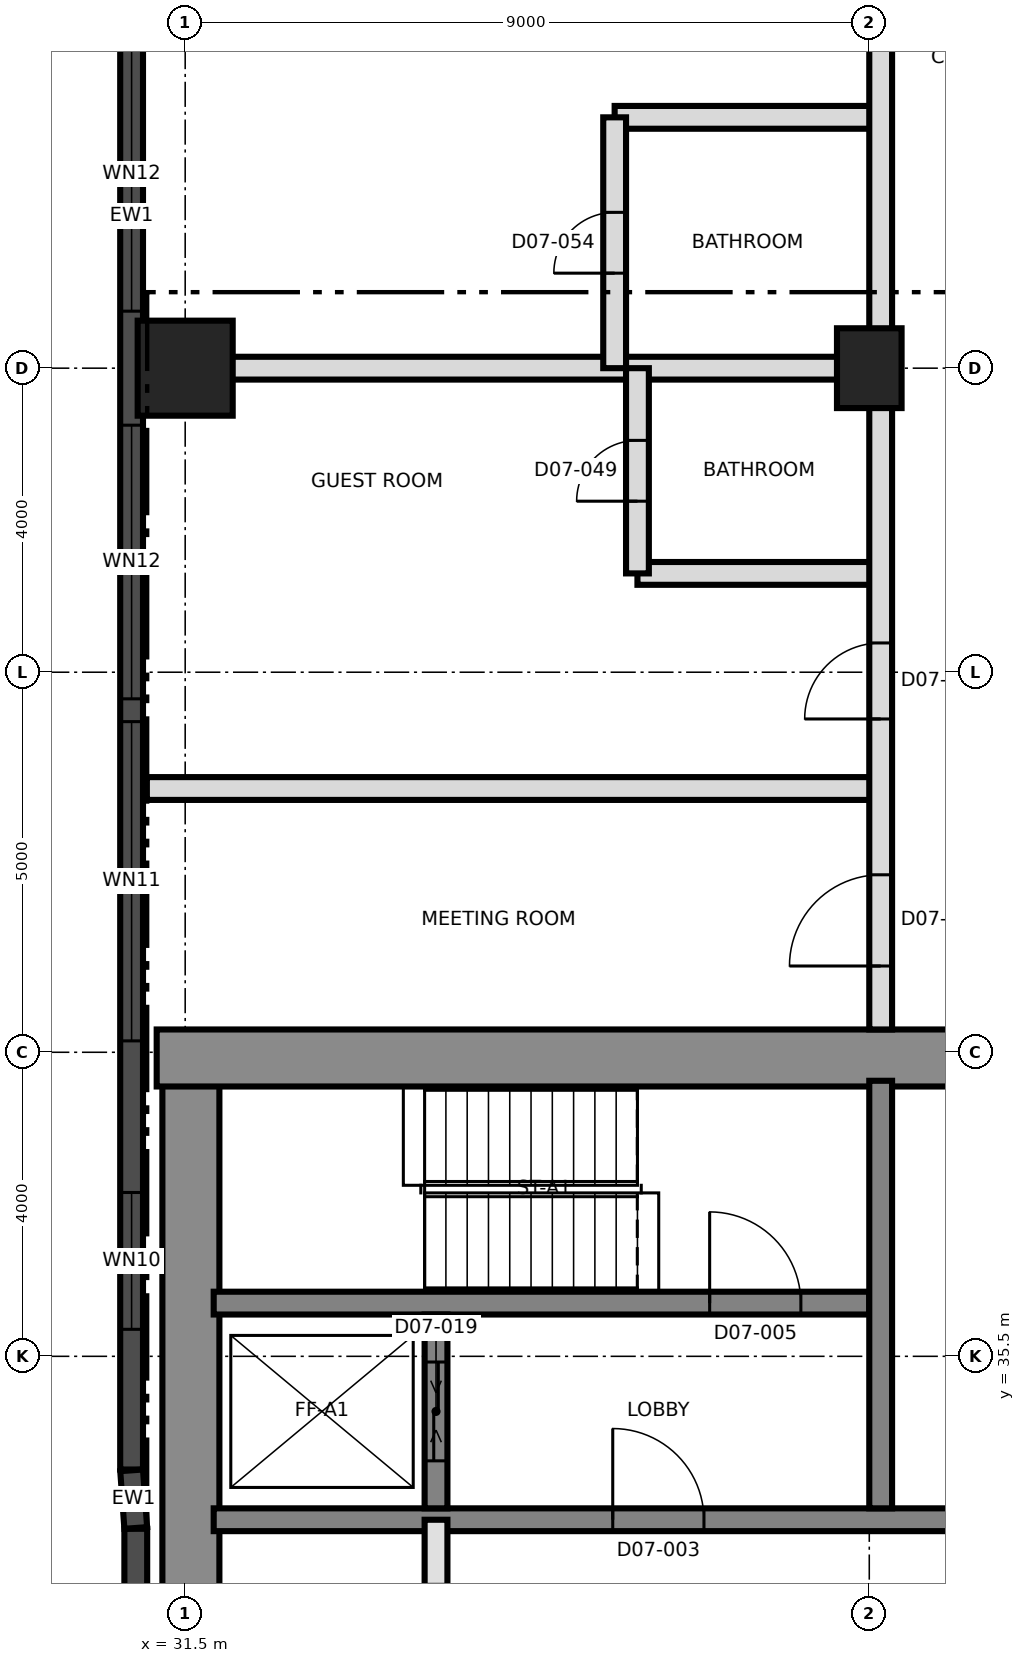
"""IFC4 building model, lengths in metres.
Left out: names, types, materials, properties, quantities, classifications, styles, units other than length and angle.
Written with IfcOpenShell. Run it as: python <this file> out.ifc"""

import sys

from ifc_helpers import new_model, si_unit, direction, frame, frame_2d, origin, origin_2d, place, context, subcontext, project, spatial, rectangle, extrude, element, fill, save


model = new_model("IFC4")
c1 = context("Model", 3, precision=1e-05, world=origin(), true_north=direction((0.0, 1.0)))
c2 = subcontext(c1, "Body", "Model", "MODEL_VIEW")
j1 = project(units=[si_unit("LENGTHUNIT", "METRE"), si_unit("PLANEANGLEUNIT", "RADIAN")], contexts=[c1])
p1 = place(None, origin())
s1 = spatial("IfcSite", under=j1, at=p1, CompositionType="ELEMENT")
p2 = place(p1, origin())
s2 = spatial("IfcBuilding", under=s1, at=p2, CompositionType="ELEMENT")
p3 = place(p2, frame((0.0, 0.0, 94.5)))
s3 = spatial("IfcBuildingStorey", under=s2, at=p3, CompositionType="ELEMENT", Elevation=94.5)
p4 = place(p3, frame((31.575, 21.875, 0.0), z_axis=(0.0, 0.0, 1.0), x_axis=(0.0, 1.0, 0.0)))
e1 = element("IfcWall", 1, at=p4, inside=s3, PredefinedType="SHEAR", context=c2, shape_type="SweptSolid", body=[
    extrude(rectangle(XDim=17.25, YDim=0.75, at=frame_2d((8.625, 0.0))), origin(), (0.0, 0.0, 1.0), 3.7),
])
p5 = place(p3, frame((31.125, 39.425, 0.0), z_axis=(0.0, 0.0, 1.0), x_axis=(1.0, 0.0, 0.0)))
e2 = element("IfcWall", 2, at=p5, inside=s3, PredefinedType="SHEAR", context=c2, shape_type="SweptSolid", body=[
    extrude(rectangle(XDim=27.0, YDim=0.75, at=frame_2d((13.5, 0.0))), origin(), (0.0, 0.0, 1.0), 3.7),
])
p6 = place(p5, frame((10.575, 0.0, 0.0)))
e3 = element("IfcOpeningElement", 3, at=p6, cuts=e2, PredefinedType="OPENING", context=c2, shape_type="SweptSolid", body=[
    extrude(rectangle(XDim=1.2, YDim=2.1, at=frame_2d((0.6, 1.05))), frame((0.0, 0.385, 0.0), z_axis=(0.0, -1.0, 0.0), x_axis=(1.0, 0.0, 0.0)), (0.0, 0.0, 1.0), 0.77),
])
p7 = place(p3, frame((31.875, 33.35, 0.0), z_axis=(0.0, 0.0, 1.0), x_axis=(1.0, 0.0, 0.0)))
e4 = element("IfcWall", 4, at=p7, inside=s3, PredefinedType="SHEAR", context=c2, shape_type="SweptSolid", body=[
    extrude(rectangle(XDim=26.25, YDim=0.3, at=frame_2d((13.125, 0.0))), origin(), (0.0, 0.0, 1.0), 3.7),
])
p8 = place(p7, frame((13.775, 0.0, 0.0)))
e5 = element("IfcOpeningElement", 5, at=p8, cuts=e4, PredefinedType="OPENING", context=c2, shape_type="SweptSolid", body=[
    extrude(rectangle(XDim=1.4, YDim=2.1, at=frame_2d((0.7, 1.05))), frame((0.0, 0.16, 0.0), z_axis=(0.0, -1.0, 0.0), x_axis=(1.0, 0.0, 0.0)), (0.0, 0.0, 1.0), 0.32),
])
p9 = place(p7, frame((5.25, 0.0, 0.0)))
e6 = element("IfcOpeningElement", 6, at=p9, cuts=e4, PredefinedType="OPENING", context=c2, shape_type="SweptSolid", body=[
    extrude(rectangle(XDim=1.2, YDim=2.1, at=frame_2d((0.6, 1.05))), frame((0.0, 0.16, 0.0), z_axis=(0.0, -1.0, 0.0), x_axis=(1.0, 0.0, 0.0)), (0.0, 0.0, 1.0), 0.32),
])
p10 = place(p7, frame((19.8, 0.0, 0.0)))
e7 = element("IfcOpeningElement", 7, at=p10, cuts=e4, PredefinedType="OPENING", context=c2, shape_type="SweptSolid", body=[
    extrude(rectangle(XDim=1.2, YDim=2.1, at=frame_2d((0.6, 1.05))), frame((0.0, 0.16, 0.0), z_axis=(0.0, -1.0, 0.0), x_axis=(1.0, 0.0, 0.0)), (0.0, 0.0, 1.0), 0.32),
])
p11 = place(p3, frame((31.875, 36.2, 0.0), z_axis=(0.0, 0.0, 1.0), x_axis=(1.0, 0.0, 0.0)))
e8 = element("IfcWall", 8, at=p11, inside=s3, PredefinedType="SHEAR", context=c2, shape_type="SweptSolid", body=[
    extrude(rectangle(XDim=8.625, YDim=0.3, at=frame_2d((4.312, 0.0))), origin(), (0.0, 0.0, 1.0), 3.7),
])
p12 = place(p11, frame((6.525, 0.0, 0.0)))
e9 = element("IfcOpeningElement", 9, at=p12, cuts=e8, PredefinedType="OPENING", context=c2, shape_type="SweptSolid", body=[
    extrude(rectangle(XDim=1.2, YDim=2.1, at=frame_2d((0.6, 1.05))), frame((0.0, 0.16, 0.0), z_axis=(0.0, -1.0, 0.0), x_axis=(1.0, 0.0, 0.0)), (0.0, 0.0, 1.0), 0.32),
])
p13 = place(p3, frame((40.65, 33.5, 0.0), z_axis=(0.0, 0.0, 1.0), x_axis=(0.0, 1.0, 0.0)))
e10 = element("IfcWall", 10, at=p13, inside=s3, PredefinedType="SHEAR", context=c2, shape_type="SweptSolid", body=[
    extrude(rectangle(XDim=5.625, YDim=0.3, at=frame_2d((2.812, 0.0))), origin(), (0.0, 0.0, 1.0), 3.7),
])
p14 = place(p3, frame((34.8, 33.5, 0.0), z_axis=(0.0, 0.0, 1.0), x_axis=(0.0, 1.0, 0.0)))
e11 = element("IfcWall", 11, at=p14, inside=s3, PredefinedType="SHEAR", context=c2, shape_type="SweptSolid", body=[
    extrude(rectangle(XDim=2.55, YDim=0.3, at=frame_2d((1.275, 0.0))), origin(), (0.0, 0.0, 1.0), 3.7),
])
p15 = place(p14, frame((0.625, 0.0, 0.0)))
e12 = element("IfcOpeningElement", 12, at=p15, cuts=e11, PredefinedType="OPENING", context=c2, shape_type="SweptSolid", body=[
    extrude(rectangle(XDim=1.3, YDim=2.4, at=frame_2d((0.65, 1.2))), frame((0.0, 0.16, 0.0), z_axis=(0.0, -1.0, 0.0), x_axis=(1.0, 0.0, 0.0)), (0.0, 0.0, 1.0), 0.32),
])
p16 = place(p3, frame((31.5, 48.5, 0.0), z_axis=(0.0, 0.0, 1.0), x_axis=(1.0, 0.0, 0.0)))
e13 = element("IfcColumn", 13, at=p16, inside=s3, PredefinedType="COLUMN", context=c2, shape_type="SweptSolid", body=[
    extrude(rectangle(XDim=1.25, YDim=1.25, at=origin_2d()), origin(), (0.0, 0.0, 1.0), 3.7),
])
p17 = place(p3, frame((40.5, 48.5, 0.0), z_axis=(0.0, 0.0, 1.0), x_axis=(0.0, 1.0, 0.0)))
e14 = element("IfcColumn", 14, at=p17, inside=s3, PredefinedType="COLUMN", context=c2, shape_type="SweptSolid", body=[
    extrude(rectangle(XDim=1.05, YDim=0.85, at=origin_2d()), origin(), (0.0, 0.0, 1.0), 3.7),
])
p18 = place(p3, frame((30.85, 33.231, 0.0), z_axis=(0.0, 0.0, 1.0), x_axis=(0.0, -1.0, 0.0)))
e15 = element("IfcWall", 15, at=p18, inside=s3, PredefinedType="SOLIDWALL", context=c2, shape_type="SweptSolid", body=[
    extrude(rectangle(XDim=11.871, YDim=0.3, at=frame_2d((5.936, 0.0))), origin(), (0.0, 0.0, 1.0), 3.4),
])
p19 = place(p3, frame((30.795, 66.992, 0.0), z_axis=(0.0, 0.0, 1.0), x_axis=(0.0, -1.0, 0.0)))
e16 = element("IfcWall", 16, at=p19, inside=s3, PredefinedType="SOLIDWALL", context=c2, shape_type="SweptSolid", body=[
    extrude(rectangle(XDim=32.981, YDim=0.3, at=frame_2d((16.491, 0.0))), origin(), (0.0, 0.0, 1.0), 3.4),
])
p20 = place(p19, frame((1.596, 0.0, 0.3)))
e17 = element("IfcOpeningElement", 17, at=p20, cuts=e16, PredefinedType="OPENING", context=c2, shape_type="SweptSolid", body=[
    extrude(rectangle(XDim=1.8, YDim=2.4, at=frame_2d((0.9, 1.2))), frame((0.0, 0.16, 0.0), z_axis=(0.0, -1.0, 0.0), x_axis=(1.0, 0.0, 0.0)), (0.0, 0.0, 1.0), 0.32),
])
p21 = place(p19, frame((5.142, 0.0, 0.9)))
e18 = element("IfcOpeningElement", 18, at=p21, cuts=e16, PredefinedType="OPENING", context=c2, shape_type="SweptSolid", body=[
    extrude(rectangle(XDim=3.6, YDim=1.5, at=frame_2d((1.8, 0.75))), frame((0.0, 0.16, 0.0), z_axis=(0.0, -1.0, 0.0), x_axis=(1.0, 0.0, 0.0)), (0.0, 0.0, 1.0), 0.32),
])
p22 = place(p19, frame((10.242, 0.0, 0.9)))
e19 = element("IfcOpeningElement", 19, at=p22, cuts=e16, PredefinedType="OPENING", context=c2, shape_type="SweptSolid", body=[
    extrude(rectangle(XDim=3.6, YDim=1.5, at=frame_2d((1.8, 0.75))), frame((0.0, 0.16, 0.0), z_axis=(0.0, -1.0, 0.0), x_axis=(1.0, 0.0, 0.0)), (0.0, 0.0, 1.0), 0.32),
])
p23 = place(p19, frame((14.142, 0.0, 0.9)))
e20 = element("IfcOpeningElement", 20, at=p23, cuts=e16, PredefinedType="OPENING", context=c2, shape_type="SweptSolid", body=[
    extrude(rectangle(XDim=3.6, YDim=1.5, at=frame_2d((1.8, 0.75))), frame((0.0, 0.16, 0.0), z_axis=(0.0, -1.0, 0.0), x_axis=(1.0, 0.0, 0.0)), (0.0, 0.0, 1.0), 0.32),
])
p24 = place(p19, frame((19.242, 0.0, 0.9)))
e21 = element("IfcOpeningElement", 21, at=p24, cuts=e16, PredefinedType="OPENING", context=c2, shape_type="SweptSolid", body=[
    extrude(rectangle(XDim=3.6, YDim=1.5, at=frame_2d((1.8, 0.75))), frame((0.0, 0.16, 0.0), z_axis=(0.0, -1.0, 0.0), x_axis=(1.0, 0.0, 0.0)), (0.0, 0.0, 1.0), 0.32),
])
p25 = place(p19, frame((23.142, 0.0, 0.9)))
e22 = element("IfcOpeningElement", 22, at=p25, cuts=e16, PredefinedType="OPENING", context=c2, shape_type="SweptSolid", body=[
    extrude(rectangle(XDim=4.2, YDim=1.5, at=frame_2d((2.1, 0.75))), frame((0.0, 0.16, 0.0), z_axis=(0.0, -1.0, 0.0), x_axis=(1.0, 0.0, 0.0)), (0.0, 0.0, 1.0), 0.32),
])
p26 = place(p19, frame((29.337, 0.0, 0.3)))
e23 = element("IfcOpeningElement", 23, at=p26, cuts=e16, PredefinedType="OPENING", context=c2, shape_type="SweptSolid", body=[
    extrude(rectangle(XDim=1.8, YDim=2.4, at=frame_2d((0.9, 1.2))), frame((0.0, 0.16, 0.0), z_axis=(0.0, -1.0, 0.0), x_axis=(1.0, 0.0, 0.0)), (0.0, 0.0, 1.0), 0.32),
])
p27 = place(p3, frame((30.795, 34.0, 0.0), z_axis=(0.0, 0.0, 1.0), x_axis=(0.07129269393, -0.997455438499, 0.0)))
e24 = element("IfcWall", 24, at=p27, inside=s3, PredefinedType="SOLIDWALL", context=c2, shape_type="SweptSolid", body=[
    extrude(rectangle(XDim=0.76, YDim=0.3, at=frame_2d((0.38, 0.0))), origin(), (0.0, 0.0, 1.0), 3.4),
])
p28 = place(p3, frame((34.8, 27.9, 0.0), z_axis=(0.0, 0.0, 1.0), x_axis=(0.0, 1.0, 0.0)))
e25 = element("IfcWall", 25, at=p28, inside=s3, PredefinedType="SOLIDWALL", context=c2, shape_type="SweptSolid", body=[
    extrude(rectangle(XDim=5.45, YDim=0.3, at=frame_2d((2.725, 0.0))), origin(), (0.0, 0.0, 1.0), 3.4),
])
p29 = place(p28, frame((3.6, 0.0, 0.0)))
e26 = element("IfcOpeningElement", 26, at=p29, cuts=e25, PredefinedType="OPENING", context=c2, shape_type="SweptSolid", body=[
    extrude(rectangle(XDim=1.0, YDim=2.1, at=frame_2d((0.5, 1.05))), frame((0.0, 0.16, 0.0), z_axis=(0.0, -1.0, 0.0), x_axis=(1.0, 0.0, 0.0)), (0.0, 0.0, 1.0), 0.32),
])
p30 = place(p3, frame((30.995, 42.97, 0.0), z_axis=(0.0, 0.0, 1.0), x_axis=(1.0, 0.0, 0.0)))
e27 = element("IfcWall", 27, at=p30, inside=s3, PredefinedType="PARTITIONING", context=c2, shape_type="SweptSolid", body=[
    extrude(rectangle(XDim=9.655, YDim=0.3, at=frame_2d((4.827, 0.0))), origin(), (0.0, 0.0, 1.0), 3.35),
])
p31 = place(p3, frame((37.45, 45.8, 0.0), z_axis=(0.0, 0.0, 1.0), x_axis=(1.0, 0.0, 0.0)))
e28 = element("IfcWall", 28, at=p31, inside=s3, PredefinedType="PARTITIONING", context=c2, shape_type="SweptSolid", body=[
    extrude(rectangle(XDim=3.2, YDim=0.3, at=frame_2d((1.6, 0.0))), origin(), (0.0, 0.0, 1.0), 3.4),
])
p32 = place(p3, frame((30.995, 48.5, 0.0), z_axis=(0.0, 0.0, 1.0), x_axis=(1.0, 0.0, 0.0)))
e29 = element("IfcWall", 29, at=p32, inside=s3, PredefinedType="PARTITIONING", context=c2, shape_type="SweptSolid", body=[
    extrude(rectangle(XDim=9.655, YDim=0.3, at=frame_2d((4.827, 0.0))), origin(), (0.0, 0.0, 1.0), 3.35),
])
p33 = place(p3, frame((37.15, 51.8, 0.0), z_axis=(0.0, 0.0, 1.0), x_axis=(1.0, 0.0, 0.0)))
e30 = element("IfcWall", 30, at=p33, inside=s3, PredefinedType="PARTITIONING", context=c2, shape_type="SweptSolid", body=[
    extrude(rectangle(XDim=3.5, YDim=0.3, at=frame_2d((1.75, 0.0))), origin(), (0.0, 0.0, 1.0), 3.4),
])
p34 = place(p3, frame((37.15, 48.5, 0.0), z_axis=(0.0, 0.0, 1.0), x_axis=(0.0, 1.0, 0.0)))
e31 = element("IfcWall", 31, at=p34, inside=s3, PredefinedType="PARTITIONING", context=c2, shape_type="SweptSolid", body=[
    extrude(rectangle(XDim=3.3, YDim=0.3, at=frame_2d((1.65, 0.0))), origin(), (0.0, 0.0, 1.0), 3.4),
])
p35 = place(p34, frame((1.25, 0.0, 0.0)))
e32 = element("IfcOpeningElement", 32, at=p35, cuts=e31, PredefinedType="OPENING", context=c2, shape_type="SweptSolid", body=[
    extrude(rectangle(XDim=0.8, YDim=2.1, at=frame_2d((0.4, 1.05))), frame((0.0, 0.16, 0.0), z_axis=(0.0, -1.0, 0.0), x_axis=(1.0, 0.0, 0.0)), (0.0, 0.0, 1.0), 0.32),
])
p36 = place(p3, frame((37.45, 45.8, 0.0), z_axis=(0.0, 0.0, 1.0), x_axis=(0.0, 1.0, 0.0)))
e33 = element("IfcWall", 33, at=p36, inside=s3, PredefinedType="PARTITIONING", context=c2, shape_type="SweptSolid", body=[
    extrude(rectangle(XDim=2.7, YDim=0.3, at=frame_2d((1.35, 0.0))), origin(), (0.0, 0.0, 1.0), 3.4),
])
p37 = place(p36, frame((0.95, 0.0, 0.0)))
e34 = element("IfcOpeningElement", 34, at=p37, cuts=e33, PredefinedType="OPENING", context=c2, shape_type="SweptSolid", body=[
    extrude(rectangle(XDim=0.8, YDim=2.1, at=frame_2d((0.4, 1.05))), frame((0.0, 0.16, 0.0), z_axis=(0.0, -1.0, 0.0), x_axis=(1.0, 0.0, 0.0)), (0.0, 0.0, 1.0), 0.32),
])
p38 = place(p3, frame((40.65, 39.8, 0.0), z_axis=(0.0, 0.0, 1.0), x_axis=(0.0, 1.0, 0.0)))
e35 = element("IfcWall", 35, at=p38, inside=s3, PredefinedType="PARTITIONING", context=c2, shape_type="SweptSolid", body=[
    extrude(rectangle(XDim=36.205, YDim=0.3, at=frame_2d((18.103, 0.0))), origin(), (0.0, 0.0, 1.0), 3.35),
])
p39 = place(p38, frame((0.835, 0.0, 0.0)))
e36 = element("IfcOpeningElement", 36, at=p39, cuts=e35, PredefinedType="OPENING", context=c2, shape_type="SweptSolid", body=[
    extrude(rectangle(XDim=1.2, YDim=2.1, at=frame_2d((0.6, 1.05))), frame((0.0, 0.16, 0.0), z_axis=(0.0, -1.0, 0.0), x_axis=(1.0, 0.0, 0.0)), (0.0, 0.0, 1.0), 0.32),
])
p40 = place(p38, frame((4.085, 0.0, 0.0)))
e37 = element("IfcOpeningElement", 37, at=p40, cuts=e35, PredefinedType="OPENING", context=c2, shape_type="SweptSolid", body=[
    extrude(rectangle(XDim=1.0, YDim=2.1, at=frame_2d((0.5, 1.05))), frame((0.0, 0.16, 0.0), z_axis=(0.0, -1.0, 0.0), x_axis=(1.0, 0.0, 0.0)), (0.0, 0.0, 1.0), 0.32),
])
p41 = place(p38, frame((14.35, 0.0, 0.0)))
e38 = element("IfcOpeningElement", 38, at=p41, cuts=e35, PredefinedType="OPENING", context=c2, shape_type="SweptSolid", body=[
    extrude(rectangle(XDim=1.0, YDim=2.4, at=frame_2d((0.5, 1.2))), frame((0.0, 0.16, 0.0), z_axis=(0.0, -1.0, 0.0), x_axis=(1.0, 0.0, 0.0)), (0.0, 0.0, 1.0), 0.32),
])
p42 = place(p38, frame((21.2, 0.0, 0.0)))
e39 = element("IfcOpeningElement", 39, at=p42, cuts=e35, PredefinedType="OPENING", context=c2, shape_type="SweptSolid", body=[
    extrude(rectangle(XDim=1.0, YDim=2.4, at=frame_2d((0.5, 1.2))), frame((0.0, 0.16, 0.0), z_axis=(0.0, -1.0, 0.0), x_axis=(1.0, 0.0, 0.0)), (0.0, 0.0, 1.0), 0.32),
])
p43 = place(p23, origin())
e40 = element("IfcWindow", 40, at=p43, inside=s3, PartitioningType="SINGLE_PANEL", PredefinedType="WINDOW", context=c2, shape_type="SweptSolid", body=[
    extrude(rectangle(XDim=3.6, YDim=1.5, at=frame_2d((1.8, 0.75))), frame((0.0, 0.03, 0.0), z_axis=(0.0, -1.0, 0.0), x_axis=(1.0, 0.0, 0.0)), (0.0, 0.0, 1.0), 0.06),
])
fill(e20, e40)
p44 = place(p24, origin())
e41 = element("IfcWindow", 41, at=p44, inside=s3, PartitioningType="SINGLE_PANEL", PredefinedType="WINDOW", context=c2, shape_type="SweptSolid", body=[
    extrude(rectangle(XDim=3.6, YDim=1.5, at=frame_2d((1.8, 0.75))), frame((0.0, 0.03, 0.0), z_axis=(0.0, -1.0, 0.0), x_axis=(1.0, 0.0, 0.0)), (0.0, 0.0, 1.0), 0.06),
])
fill(e21, e41)
p45 = place(p25, origin())
e42 = element("IfcWindow", 42, at=p45, inside=s3, PartitioningType="SINGLE_PANEL", PredefinedType="WINDOW", context=c2, shape_type="SweptSolid", body=[
    extrude(rectangle(XDim=4.2, YDim=1.5, at=frame_2d((2.1, 0.75))), frame((0.0, 0.03, 0.0), z_axis=(0.0, -1.0, 0.0), x_axis=(1.0, 0.0, 0.0)), (0.0, 0.0, 1.0), 0.06),
])
fill(e22, e42)
p46 = place(p26, origin())
e43 = element("IfcWindow", 43, at=p46, inside=s3, PartitioningType="SINGLE_PANEL", PredefinedType="WINDOW", context=c2, shape_type="SweptSolid", body=[
    extrude(rectangle(XDim=1.8, YDim=2.4, at=frame_2d((0.9, 1.2))), frame((0.0, 0.03, 0.0), z_axis=(0.0, -1.0, 0.0), x_axis=(1.0, 0.0, 0.0)), (0.0, 0.0, 1.0), 0.06),
])
fill(e23, e43)
p47 = place(p9, origin())
e44 = element("IfcDoor", 44, at=p47, inside=s3, OperationType="SINGLE_SWING_LEFT", PredefinedType="DOOR", context=c2, shape_type="SweptSolid", body=[
    extrude(rectangle(XDim=1.2, YDim=2.1, at=frame_2d((0.6, 1.05))), frame((0.0, 0.025, 0.0), z_axis=(0.0, -1.0, 0.0), x_axis=(1.0, 0.0, 0.0)), (0.0, 0.0, 1.0), 0.05),
])
fill(e6, e44)
p48 = place(p12, origin())
e45 = element("IfcDoor", 45, at=p48, inside=s3, OperationType="SINGLE_SWING_RIGHT", PredefinedType="DOOR", context=c2, shape_type="SweptSolid", body=[
    extrude(rectangle(XDim=1.2, YDim=2.1, at=frame_2d((0.6, 1.05))), frame((0.0, 0.025, 0.0), z_axis=(0.0, -1.0, 0.0), x_axis=(1.0, 0.0, 0.0)), (0.0, 0.0, 1.0), 0.05),
])
fill(e9, e45)
p49 = place(p15, origin())
e46 = element("IfcDoor", 46, at=p49, inside=s3, OperationType="SLIDING_TO_LEFT", PredefinedType="DOOR", context=c2, shape_type="SweptSolid", body=[
    extrude(rectangle(XDim=1.3, YDim=2.4, at=frame_2d((0.65, 1.2))), frame((0.0, 0.025, 0.0), z_axis=(0.0, -1.0, 0.0), x_axis=(1.0, 0.0, 0.0)), (0.0, 0.0, 1.0), 0.05),
])
fill(e12, e46)
p50 = place(p39, origin())
e47 = element("IfcDoor", 47, at=p50, inside=s3, OperationType="SINGLE_SWING_LEFT", PredefinedType="DOOR", context=c2, shape_type="SweptSolid", body=[
    extrude(rectangle(XDim=1.2, YDim=2.1, at=frame_2d((0.6, 1.05))), frame((0.0, 0.025, 0.0), z_axis=(0.0, -1.0, 0.0), x_axis=(1.0, 0.0, 0.0)), (0.0, 0.0, 1.0), 0.05),
])
fill(e36, e47)
p51 = place(p37, origin())
e48 = element("IfcDoor", 48, at=p51, inside=s3, OperationType="SINGLE_SWING_LEFT", PredefinedType="DOOR", context=c2, shape_type="SweptSolid", body=[
    extrude(rectangle(XDim=0.8, YDim=2.1, at=frame_2d((0.4, 1.05))), frame((0.0, 0.025, 0.0), z_axis=(0.0, -1.0, 0.0), x_axis=(1.0, 0.0, 0.0)), (0.0, 0.0, 1.0), 0.05),
])
fill(e34, e48)
p52 = place(p40, origin())
e49 = element("IfcDoor", 49, at=p52, inside=s3, OperationType="SINGLE_SWING_RIGHT", PredefinedType="DOOR", context=c2, shape_type="SweptSolid", body=[
    extrude(rectangle(XDim=1.0, YDim=2.1, at=frame_2d((0.5, 1.05))), frame((0.0, 0.025, 0.0), z_axis=(0.0, -1.0, 0.0), x_axis=(1.0, 0.0, 0.0)), (0.0, 0.0, 1.0), 0.05),
])
fill(e37, e49)
p53 = place(p35, origin())
e50 = element("IfcDoor", 50, at=p53, inside=s3, OperationType="SINGLE_SWING_RIGHT", PredefinedType="DOOR", context=c2, shape_type="SweptSolid", body=[
    extrude(rectangle(XDim=0.8, YDim=2.1, at=frame_2d((0.4, 1.05))), frame((0.0, 0.025, 0.0), z_axis=(0.0, -1.0, 0.0), x_axis=(1.0, 0.0, 0.0)), (0.0, 0.0, 1.0), 0.05),
])
fill(e32, e50)
save(model, sys.argv[1])
